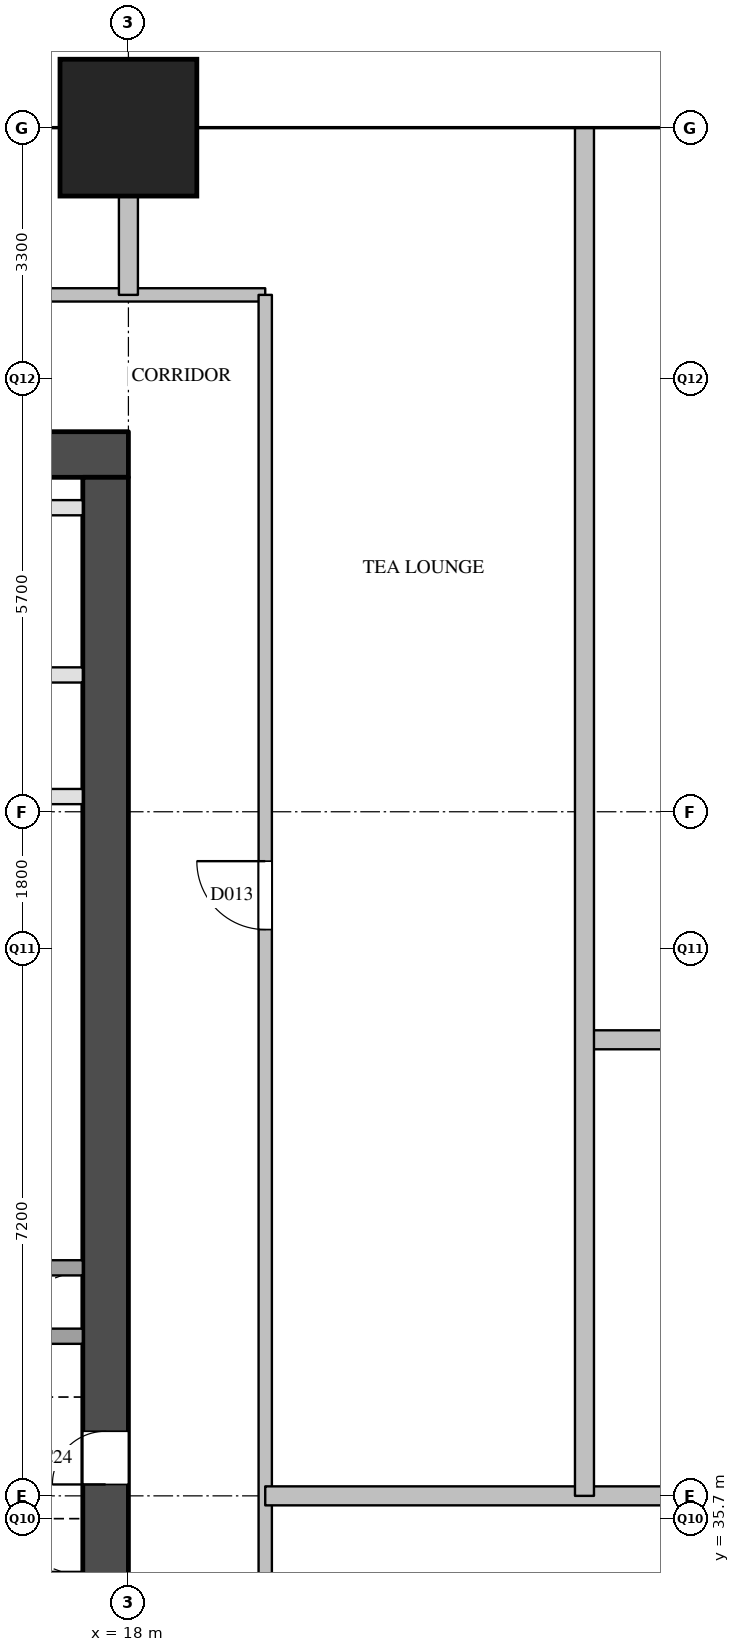
"""IFC4 building model, lengths in metres.
Left out: names, types, materials, properties, quantities, classifications, styles, units other than length and angle.
Written with IfcOpenShell. Run it as: python <this file> out.ifc"""

import sys

from ifc_helpers import new_model, si_unit, direction, frame, frame_2d, origin, origin_2d, place, context, subcontext, project, spatial, rectangle, extrude, element, fill, save


model = new_model("IFC4")
c1 = context("Model", 3, precision=1e-05, world=origin(), true_north=direction((0.0, 1.0)))
c2 = subcontext(c1, "Body", "Model", "MODEL_VIEW")
j1 = project(units=[si_unit("LENGTHUNIT", "METRE"), si_unit("PLANEANGLEUNIT", "RADIAN")], contexts=[c1])
p1 = place(None, origin())
s1 = spatial("IfcSite", under=j1, at=p1, CompositionType="ELEMENT")
p2 = place(p1, origin())
s2 = spatial("IfcBuilding", under=s1, at=p2, CompositionType="ELEMENT")
p3 = place(p2, frame((0.0, 0.0, 77.8)))
s3 = spatial("IfcBuildingStorey", under=s2, at=p3, CompositionType="ELEMENT", Elevation=77.8)
p4 = place(p3, frame((18.0, 54.0, 0.0), z_axis=(0.0, 0.0, 1.0), x_axis=(1.0, 0.0, 0.0)))
e1 = element("IfcColumn", 1, at=p4, inside=s3, PredefinedType="COLUMN", context=c2, shape_type="SweptSolid", body=[
    extrude(rectangle(XDim=1.8, YDim=1.8, at=origin_2d()), origin(), (0.0, 0.0, 1.0), 3.8),
])
p5 = place(p3, frame((5.6, 49.7, 0.0), z_axis=(0.0, 0.0, 1.0), x_axis=(1.0, 0.0, 0.0)))
e2 = element("IfcWall", 2, at=p5, inside=s3, PredefinedType="SHEAR", context=c2, shape_type="SweptSolid", body=[
    extrude(rectangle(XDim=12.4, YDim=0.6, at=frame_2d((6.2, 0.0))), origin(), (0.0, 0.0, 1.0), 3.5),
])
p6 = place(p3, frame((17.7, 29.1, 0.0), z_axis=(0.0, 0.0, 1.0), x_axis=(0.0, 1.0, 0.0)))
e3 = element("IfcWall", 3, at=p6, inside=s3, PredefinedType="SHEAR", context=c2, shape_type="SweptSolid", body=[
    extrude(rectangle(XDim=20.3, YDim=0.6, at=frame_2d((10.15, 0.0))), origin(), (0.0, 0.0, 1.0), 3.5),
])
p7 = place(p6, frame((1.25, 0.0, 0.0)))
e4 = element("IfcOpeningElement", 4, at=p7, cuts=e3, PredefinedType="OPENING", context=c2, shape_type="SweptSolid", body=[
    extrude(rectangle(XDim=0.7, YDim=2.1, at=frame_2d((0.35, 1.05))), frame((0.0, 0.31, 0.0), z_axis=(0.0, -1.0, 0.0), x_axis=(1.0, 0.0, 0.0)), (0.0, 0.0, 1.0), 0.62),
])
p8 = place(p6, frame((7.05, 0.0, 0.0)))
e5 = element("IfcOpeningElement", 5, at=p8, cuts=e3, PredefinedType="OPENING", context=c2, shape_type="SweptSolid", body=[
    extrude(rectangle(XDim=0.7, YDim=2.1, at=frame_2d((0.35, 1.05))), frame((0.0, 0.31, 0.0), z_axis=(0.0, -1.0, 0.0), x_axis=(1.0, 0.0, 0.0)), (0.0, 0.0, 1.0), 0.62),
])
p9 = place(p3, frame((6.2, 38.1, 0.0), z_axis=(0.0, 0.0, 1.0), x_axis=(1.0, 0.0, 0.0)))
e6 = element("IfcWall", 6, at=p9, inside=s3, PredefinedType="SOLIDWALL", context=c2, shape_type="SweptSolid", body=[
    extrude(rectangle(XDim=11.2, YDim=0.2, at=frame_2d((5.6, 0.0))), origin(), (0.0, 0.0, 1.0), 3.5),
])
p10 = place(p9, frame((0.45, 0.0, 0.0)))
e7 = element("IfcOpeningElement", 7, at=p10, cuts=e6, PredefinedType="OPENING", context=c2, shape_type="SweptSolid", body=[
    extrude(rectangle(XDim=1.2, YDim=2.1, at=frame_2d((0.6, 1.05))), frame((0.0, 0.11, 0.0), z_axis=(0.0, -1.0, 0.0), x_axis=(1.0, 0.0, 0.0)), (0.0, 0.0, 1.0), 0.22),
])
p11 = place(p9, frame((2.55, 0.0, 0.0)))
e8 = element("IfcOpeningElement", 8, at=p11, cuts=e6, PredefinedType="OPENING", context=c2, shape_type="SweptSolid", body=[
    extrude(rectangle(XDim=1.2, YDim=2.1, at=frame_2d((0.6, 1.05))), frame((0.0, 0.11, 0.0), z_axis=(0.0, -1.0, 0.0), x_axis=(1.0, 0.0, 0.0)), (0.0, 0.0, 1.0), 0.22),
])
p12 = place(p9, frame((4.65, 0.0, 0.0)))
e9 = element("IfcOpeningElement", 9, at=p12, cuts=e6, PredefinedType="OPENING", context=c2, shape_type="SweptSolid", body=[
    extrude(rectangle(XDim=1.2, YDim=2.1, at=frame_2d((0.6, 1.05))), frame((0.0, 0.11, 0.0), z_axis=(0.0, -1.0, 0.0), x_axis=(1.0, 0.0, 0.0)), (0.0, 0.0, 1.0), 0.22),
])
p13 = place(p9, frame((6.75, 0.0, 0.0)))
e10 = element("IfcOpeningElement", 10, at=p13, cuts=e6, PredefinedType="OPENING", context=c2, shape_type="SweptSolid", body=[
    extrude(rectangle(XDim=1.2, YDim=2.1, at=frame_2d((0.6, 1.05))), frame((0.0, 0.11, 0.0), z_axis=(0.0, -1.0, 0.0), x_axis=(1.0, 0.0, 0.0)), (0.0, 0.0, 1.0), 0.22),
])
p14 = place(p3, frame((12.5, 39.0, 0.0), z_axis=(0.0, 0.0, 1.0), x_axis=(1.0, 0.0, 0.0)))
e11 = element("IfcWall", 11, at=p14, inside=s3, PredefinedType="SOLIDWALL", context=c2, shape_type="SweptSolid", body=[
    extrude(rectangle(XDim=4.9, YDim=0.2, at=frame_2d((2.45, 0.0))), origin(), (0.0, 0.0, 1.0), 3.5),
])
p15 = place(p3, frame((12.5, 45.2, 0.0), z_axis=(0.0, 0.0, 1.0), x_axis=(1.0, 0.0, 0.0)))
e12 = element("IfcWall", 12, at=p15, inside=s3, PredefinedType="PARTITIONING", context=c2, shape_type="SweptSolid", body=[
    extrude(rectangle(XDim=4.9, YDim=0.2, at=frame_2d((2.45, 0.0))), origin(), (0.0, 0.0, 1.0), 3.5),
])
p16 = place(p15, frame((1.02, 0.0, 0.0)))
e13 = element("IfcOpeningElement", 13, at=p16, cuts=e12, PredefinedType="OPENING", context=c2, shape_type="SweptSolid", body=[
    extrude(rectangle(XDim=0.9, YDim=2.1, at=frame_2d((0.45, 1.05))), frame((0.0, 0.11, 0.0), z_axis=(0.0, -1.0, 0.0), x_axis=(1.0, 0.0, 0.0)), (0.0, 0.0, 1.0), 0.22),
])
p17 = place(p15, frame((3.47, 0.0, 0.0)))
e14 = element("IfcOpeningElement", 14, at=p17, cuts=e12, PredefinedType="OPENING", context=c2, shape_type="SweptSolid", body=[
    extrude(rectangle(XDim=0.9, YDim=2.1, at=frame_2d((0.45, 1.05))), frame((0.0, 0.11, 0.0), z_axis=(0.0, -1.0, 0.0), x_axis=(1.0, 0.0, 0.0)), (0.0, 0.0, 1.0), 0.22),
])
p18 = place(p3, frame((6.2, 46.8, 0.0), z_axis=(0.0, 0.0, 1.0), x_axis=(1.0, 0.0, 0.0)))
e15 = element("IfcWall", 15, at=p18, inside=s3, PredefinedType="PARTITIONING", context=c2, shape_type="SweptSolid", body=[
    extrude(rectangle(XDim=11.2, YDim=0.2, at=frame_2d((5.6, 0.0))), origin(), (0.0, 0.0, 1.0), 3.5),
])
p19 = place(p18, frame((2.35, 0.0, 0.0)))
e16 = element("IfcOpeningElement", 16, at=p19, cuts=e15, PredefinedType="OPENING", context=c2, shape_type="SweptSolid", body=[
    extrude(rectangle(XDim=0.9, YDim=2.1, at=frame_2d((0.45, 1.05))), frame((0.0, 0.11, 0.0), z_axis=(0.0, -1.0, 0.0), x_axis=(1.0, 0.0, 0.0)), (0.0, 0.0, 1.0), 0.22),
])
p20 = place(p18, frame((7.95, 0.0, 0.0)))
e17 = element("IfcOpeningElement", 17, at=p20, cuts=e15, PredefinedType="OPENING", context=c2, shape_type="SweptSolid", body=[
    extrude(rectangle(XDim=0.9, YDim=2.1, at=frame_2d((0.45, 1.05))), frame((0.0, 0.11, 0.0), z_axis=(0.0, -1.0, 0.0), x_axis=(1.0, 0.0, 0.0)), (0.0, 0.0, 1.0), 0.22),
])
p21 = place(p3, frame((6.2, 49.0, 0.0), z_axis=(0.0, 0.0, 1.0), x_axis=(1.0, 0.0, 0.0)))
e18 = element("IfcWall", 18, at=p21, inside=s3, PredefinedType="PARTITIONING", context=c2, shape_type="SweptSolid", body=[
    extrude(rectangle(XDim=11.2, YDim=0.2, at=frame_2d((5.6, 0.0))), origin(), (0.0, 0.0, 1.0), 3.5),
])
p22 = place(p3, frame((3.8, 51.8, 0.0), z_axis=(0.0, 0.0, 1.0), x_axis=(1.0, 0.0, 0.0)))
e19 = element("IfcWall", 19, at=p22, inside=s3, PredefinedType="PARTITIONING", context=c2, shape_type="SweptSolid", body=[
    extrude(rectangle(XDim=16.0, YDim=0.175, at=frame_2d((8.0, 0.0))), origin(), (0.0, 0.0, 1.0), 3.5),
])
p23 = place(p3, frame((19.8, 28.5, 0.0), z_axis=(0.0, 0.0, 1.0), x_axis=(0.0, 1.0, 0.0)))
e20 = element("IfcWall", 20, at=p23, inside=s3, PredefinedType="PARTITIONING", context=c2, shape_type="SweptSolid", body=[
    extrude(rectangle(XDim=23.3, YDim=0.175, at=frame_2d((11.65, 0.0))), origin(), (0.0, 0.0, 1.0), 3.5),
])
p24 = place(p23, frame((3.3, 0.0, 0.0)))
e21 = element("IfcOpeningElement", 21, at=p24, cuts=e20, PredefinedType="OPENING", context=c2, shape_type="SweptSolid", body=[
    extrude(rectangle(XDim=0.9, YDim=2.1, at=frame_2d((0.45, 1.05))), frame((0.0, 0.097, 0.0), z_axis=(0.0, -1.0, 0.0), x_axis=(1.0, 0.0, 0.0)), (0.0, 0.0, 1.0), 0.195),
])
p25 = place(p23, frame((14.95, 0.0, 0.0)))
e22 = element("IfcOpeningElement", 22, at=p25, cuts=e20, PredefinedType="OPENING", context=c2, shape_type="SweptSolid", body=[
    extrude(rectangle(XDim=0.9, YDim=2.1, at=frame_2d((0.45, 1.05))), frame((0.0, 0.097, 0.0), z_axis=(0.0, -1.0, 0.0), x_axis=(1.0, 0.0, 0.0)), (0.0, 0.0, 1.0), 0.195),
])
p26 = place(p3, frame((19.8, 36.0, 0.0), z_axis=(0.0, 0.0, 1.0), x_axis=(1.0, 0.0, 0.0)))
e23 = element("IfcWall", 23, at=p26, inside=s3, PredefinedType="PARTITIONING", context=c2, shape_type="SweptSolid", body=[
    extrude(rectangle(XDim=14.4, YDim=0.25, at=frame_2d((7.2, 0.0))), origin(), (0.0, 0.0, 1.0), 3.5),
])
p27 = place(p3, frame((24.0, 42.0, 0.0), z_axis=(0.0, 0.0, 1.0), x_axis=(1.0, 0.0, 0.0)))
e24 = element("IfcWall", 24, at=p27, inside=s3, PredefinedType="PARTITIONING", context=c2, shape_type="SweptSolid", body=[
    extrude(rectangle(XDim=10.2, YDim=0.25, at=frame_2d((5.1, 0.0))), origin(), (0.0, 0.0, 1.0), 2.5),
])
p28 = place(p3, frame((18.0, 51.8, 0.0), z_axis=(0.0, 0.0, 1.0), x_axis=(0.0, 1.0, 0.0)))
e25 = element("IfcWall", 25, at=p28, inside=s3, PredefinedType="PARTITIONING", context=c2, shape_type="SweptSolid", body=[
    extrude(rectangle(XDim=2.2, YDim=0.25, at=frame_2d((1.1, 0.0))), origin(), (0.0, 0.0, 1.0), 3.5),
])
p29 = place(p3, frame((24.0, 36.0, 0.0), z_axis=(0.0, 0.0, 1.0), x_axis=(0.0, 1.0, 0.0)))
e26 = element("IfcWall", 26, at=p29, inside=s3, PredefinedType="PARTITIONING", context=c2, shape_type="SweptSolid", body=[
    extrude(rectangle(XDim=18.0, YDim=0.25, at=frame_2d((9.0, 0.0))), origin(), (0.0, 0.0, 1.0), 2.5),
])
p30 = place(p8, origin())
e27 = element("IfcDoor", 27, at=p30, inside=s3, OperationType="SINGLE_SWING_LEFT", PredefinedType="DOOR", context=c2, shape_type="SweptSolid", body=[
    extrude(rectangle(XDim=0.7, YDim=2.1, at=frame_2d((0.35, 1.05))), frame((0.0, 0.025, 0.0), z_axis=(0.0, -1.0, 0.0), x_axis=(1.0, 0.0, 0.0)), (0.0, 0.0, 1.0), 0.05),
])
fill(e5, e27)
p31 = place(p25, origin())
e28 = element("IfcDoor", 28, at=p31, inside=s3, OperationType="SINGLE_SWING_RIGHT", PredefinedType="DOOR", context=c2, shape_type="SweptSolid", body=[
    extrude(rectangle(XDim=0.9, YDim=2.1, at=frame_2d((0.45, 1.05))), frame((0.0, 0.025, 0.0), z_axis=(0.0, -1.0, 0.0), x_axis=(1.0, 0.0, 0.0)), (0.0, 0.0, 1.0), 0.05),
])
fill(e22, e28)
save(model, sys.argv[1])
